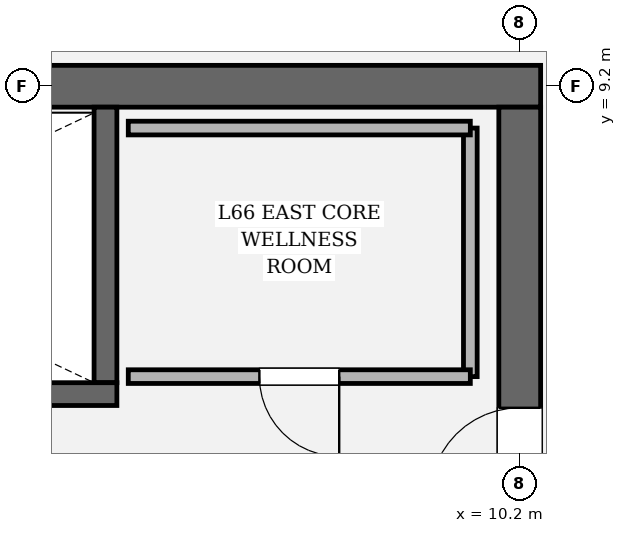
"""IFC4 building model, lengths in metres.
Left out: names, types, materials, properties, quantities, classifications, styles, units other than length and angle.
Written with IfcOpenShell. Run it as: python <this file> out.ifc"""

import sys

from ifc_helpers import new_model, si_unit, direction, frame, frame_2d, origin, place, context, subcontext, project, spatial, rectangle, extrude, element, fill, save


model = new_model("IFC4")
c1 = context("Model", 3, precision=1e-05, world=origin(), true_north=direction((0.0, 1.0)))
c2 = subcontext(c1, "Body", "Model", "MODEL_VIEW")
j1 = project(units=[si_unit("LENGTHUNIT", "METRE"), si_unit("PLANEANGLEUNIT", "RADIAN")], contexts=[c1])
p1 = place(None, origin())
s1 = spatial("IfcSite", under=j1, at=p1, CompositionType="ELEMENT")
p2 = place(p1, origin())
s2 = spatial("IfcBuilding", under=s1, at=p2, CompositionType="ELEMENT")
p3 = place(p2, frame((0.0, 0.0, 279.75)))
s3 = spatial("IfcBuildingStorey", under=s2, at=p3, CompositionType="ELEMENT", Elevation=279.75)
p4 = place(p3, frame((-10.475, 9.2, 0.0), z_axis=(0.0, 0.0, 1.0), x_axis=(1.0, 0.0, 0.0)))
e1 = element("IfcWall", 1, at=p4, inside=s3, PredefinedType="SHEAR", context=c2, shape_type="SweptSolid", body=[
    extrude(rectangle(XDim=20.95, YDim=0.55, at=frame_2d((10.475, 0.0))), origin(), (0.0, 0.0, 1.0), 4.05),
])
p5 = place(p3, frame((10.2, 8.925, 0.0), z_axis=(0.0, 0.0, 1.0), x_axis=(0.0, -1.0, 0.0)))
e2 = element("IfcWall", 2, at=p5, inside=s3, PredefinedType="SHEAR", context=c2, shape_type="SweptSolid", body=[
    extrude(rectangle(XDim=17.85, YDim=0.55, at=frame_2d((8.925, 0.0))), origin(), (0.0, 0.0, 1.0), 4.05),
])
p6 = place(p5, frame((3.955, 0.0, 0.0)))
e3 = element("IfcOpeningElement", 3, at=p6, cuts=e2, PredefinedType="OPENING", context=c2, shape_type="SweptSolid", body=[
    extrude(rectangle(XDim=1.18, YDim=2.2, at=frame_2d((0.59, 1.1))), frame((0.0, 0.285, 0.0), z_axis=(0.0, -1.0, 0.0), x_axis=(1.0, 0.0, 0.0)), (0.0, 0.0, 1.0), 0.57),
])
p7 = place(p3, frame((4.75, 8.925, 0.0), z_axis=(0.0, 0.0, 1.0), x_axis=(0.0, -1.0, 0.0)))
e4 = element("IfcWall", 4, at=p7, inside=s3, PredefinedType="SOLIDWALL", context=c2, shape_type="SweptSolid", body=[
    extrude(rectangle(XDim=3.625, YDim=0.3, at=frame_2d((1.812, 0.0))), origin(), (0.0, 0.0, 1.0), 4.05),
])
p8 = place(p3, frame((-4.9, 5.15, 0.0), z_axis=(0.0, 0.0, 1.0), x_axis=(1.0, 0.0, 0.0)))
e5 = element("IfcWall", 5, at=p8, inside=s3, PredefinedType="SOLIDWALL", context=c2, shape_type="SweptSolid", body=[
    extrude(rectangle(XDim=9.8, YDim=0.3, at=frame_2d((4.9, 0.0))), origin(), (0.0, 0.0, 1.0), 4.05),
])
p9 = place(p8, frame((0.56, 0.0, 0.0)))
e6 = element("IfcOpeningElement", 6, at=p9, cuts=e5, PredefinedType="OPENING", context=c2, shape_type="SweptSolid", body=[
    extrude(rectangle(XDim=1.18, YDim=2.2, at=frame_2d((0.59, 1.1))), frame((0.0, 0.16, 0.0), z_axis=(0.0, -1.0, 0.0), x_axis=(1.0, 0.0, 0.0)), (0.0, 0.0, 1.0), 0.32),
])
p10 = place(p3, frame((9.55, 5.38, 0.0), z_axis=(0.0, 0.0, 1.0), x_axis=(0.0, 1.0, 0.0)))
e7 = element("IfcWall", 7, at=p10, inside=s3, PredefinedType="PARTITIONING", context=c2, shape_type="SweptSolid", body=[
    extrude(rectangle(XDim=3.27, YDim=0.18, at=frame_2d((1.635, 0.0))), origin(), (0.0, 0.0, 1.0), 3.77),
])
p11 = place(p3, frame((9.55, 8.65, 0.0), z_axis=(0.0, 0.0, 1.0), x_axis=(-1.0, 0.0, 0.0)))
e8 = element("IfcWall", 8, at=p11, inside=s3, PredefinedType="PARTITIONING", context=c2, shape_type="SweptSolid", body=[
    extrude(rectangle(XDim=4.5, YDim=0.18, at=frame_2d((2.25, 0.0))), origin(), (0.0, 0.0, 1.0), 3.77),
])
p12 = place(p3, frame((5.05, 5.38, 0.0), z_axis=(0.0, 0.0, 1.0), x_axis=(1.0, 0.0, 0.0)))
e9 = element("IfcWall", 9, at=p12, inside=s3, PredefinedType="PARTITIONING", context=c2, shape_type="SweptSolid", body=[
    extrude(rectangle(XDim=4.5, YDim=0.18, at=frame_2d((2.25, 0.0))), origin(), (0.0, 0.0, 1.0), 3.77),
])
p13 = place(p12, frame((1.725, 0.0, 0.0)))
e10 = element("IfcOpeningElement", 10, at=p13, cuts=e9, PredefinedType="OPENING", context=c2, shape_type="SweptSolid", body=[
    extrude(rectangle(XDim=1.05, YDim=2.2, at=frame_2d((0.525, 1.1))), frame((0.0, 0.1, 0.0), z_axis=(0.0, -1.0, 0.0), x_axis=(1.0, 0.0, 0.0)), (0.0, 0.0, 1.0), 0.2),
])
p14 = place(p6, origin())
e11 = element("IfcDoor", 11, at=p14, inside=s3, OperationType="SINGLE_SWING_RIGHT", PredefinedType="DOOR", context=c2, shape_type="SweptSolid", body=[
    extrude(rectangle(XDim=1.18, YDim=2.2, at=frame_2d((0.59, 1.1))), frame((0.0, 0.025, 0.0), z_axis=(0.0, -1.0, 0.0), x_axis=(1.0, 0.0, 0.0)), (0.0, 0.0, 1.0), 0.05),
])
fill(e3, e11)
p15 = place(p13, origin())
e12 = element("IfcDoor", 12, at=p15, inside=s3, OperationType="SINGLE_SWING_RIGHT", PredefinedType="DOOR", context=c2, shape_type="SweptSolid", body=[
    extrude(rectangle(XDim=1.05, YDim=2.2, at=frame_2d((0.525, 1.1))), frame((0.0, 0.025, 0.0), z_axis=(0.0, -1.0, 0.0), x_axis=(1.0, 0.0, 0.0)), (0.0, 0.0, 1.0), 0.05),
])
fill(e10, e12)
save(model, sys.argv[1])
